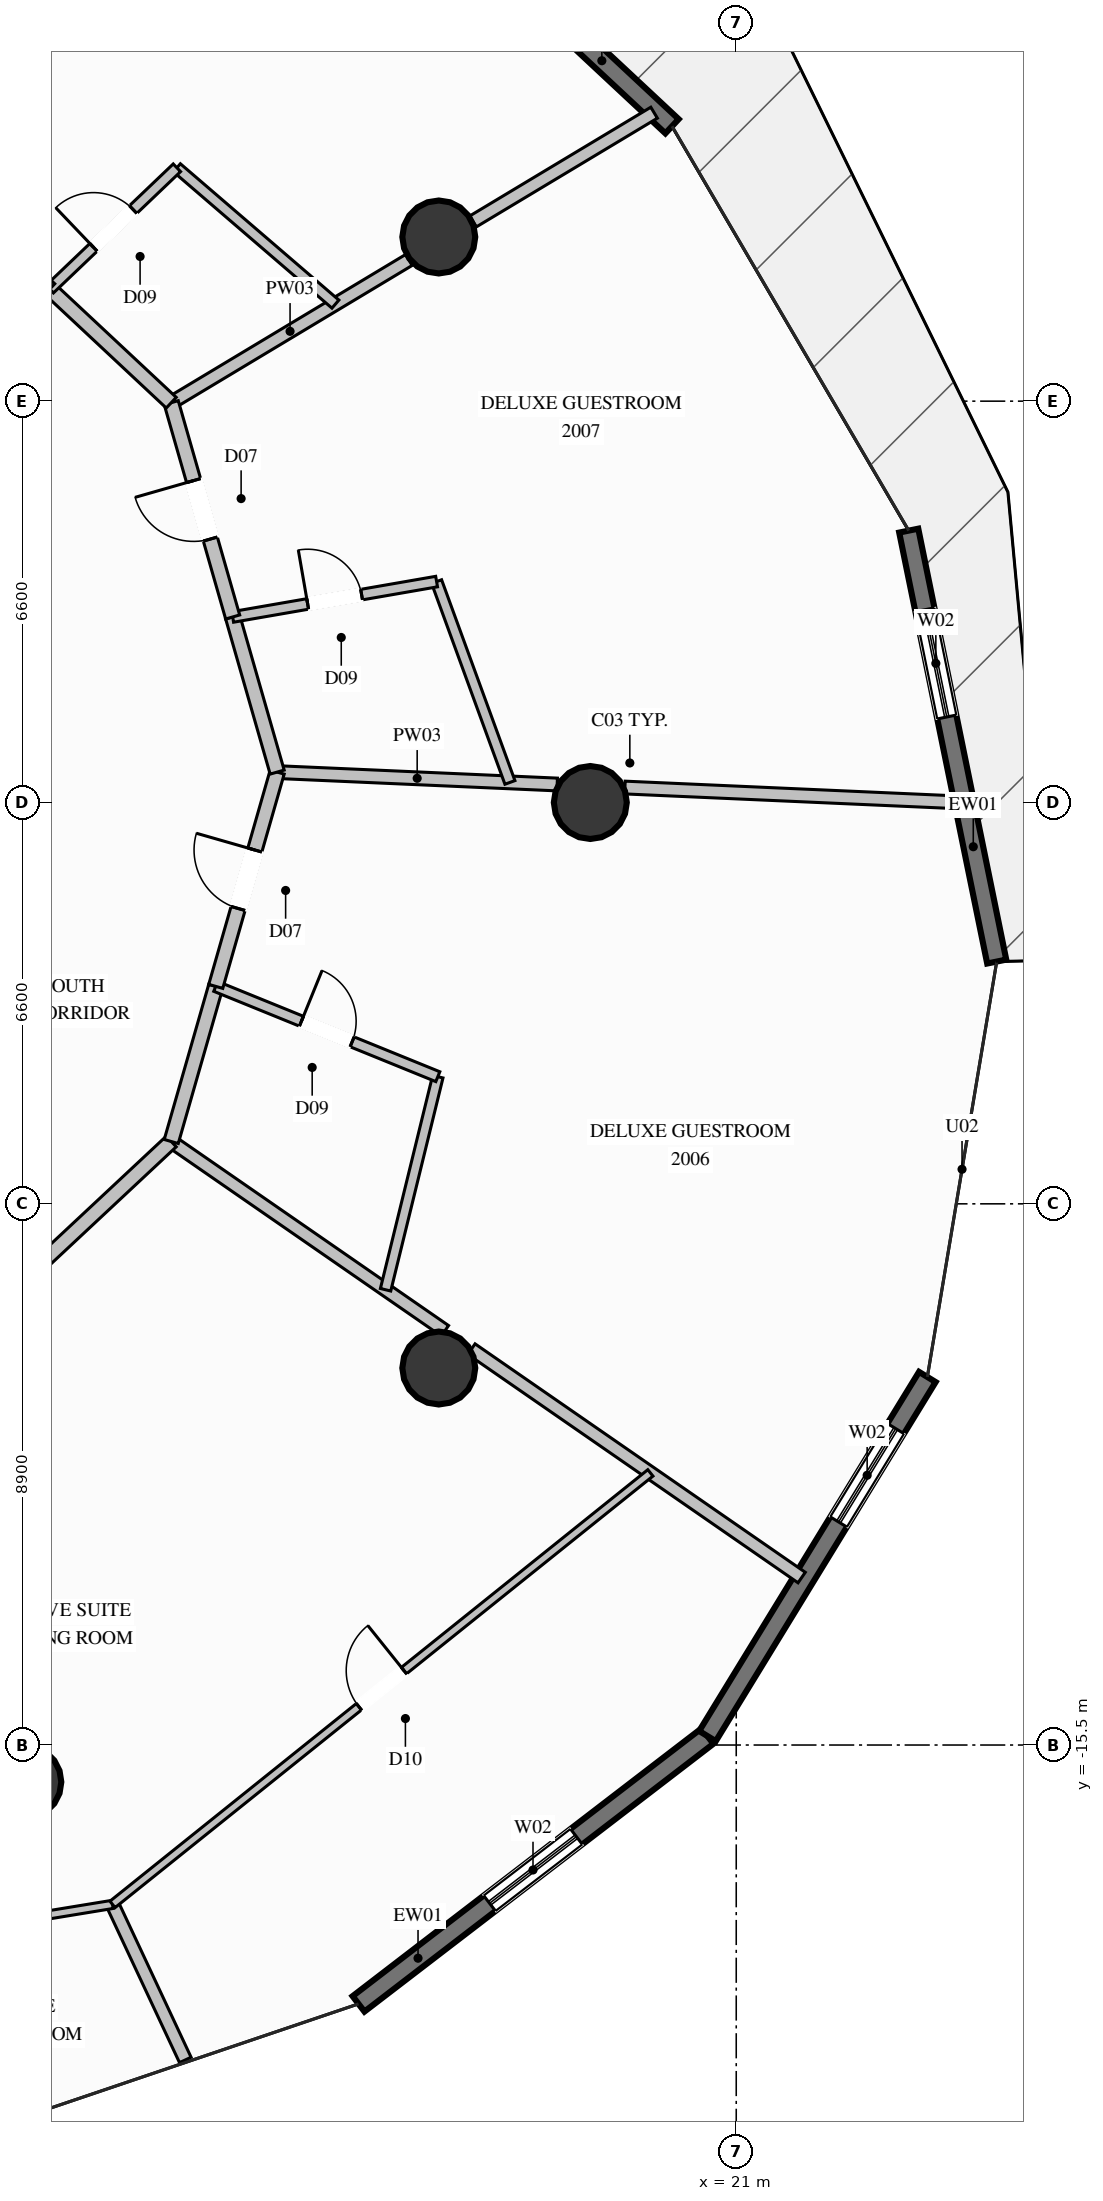
"""IFC4 building model, lengths in metres.
Left out: names, types, materials, properties, quantities, classifications, styles, units other than length and angle.
Written with IfcOpenShell. Run it as: python <this file> out.ifc"""

import sys

from ifc_helpers import new_model, si_unit, direction, frame, frame_2d, origin, origin_2d, place, context, subcontext, project, spatial, rectangle, circle, extrude, element, fill, save


model = new_model("IFC4")
c1 = context("Model", 3, precision=1e-05, world=origin(), true_north=direction((0.0, 1.0)))
c2 = subcontext(c1, "Body", "Model", "MODEL_VIEW")
j1 = project(units=[si_unit("LENGTHUNIT", "METRE"), si_unit("PLANEANGLEUNIT", "RADIAN")], contexts=[c1])
p1 = place(None, origin())
s1 = spatial("IfcSite", under=j1, at=p1, CompositionType="ELEMENT")
p2 = place(p1, origin())
s2 = spatial("IfcBuilding", under=s1, at=p2, CompositionType="ELEMENT")
p3 = place(p2, frame((0.0, 0.0, 75.2)))
s3 = spatial("IfcBuildingStorey", under=s2, at=p3, CompositionType="ELEMENT", Elevation=75.2)
for number, where, z_axis, x_axis in (
    (1, (18.6, 0.0, 0.0), (0.0, 0.0, 1.0), (1.0, 0.0, 0.0)),
    (2, (16.108, 9.3, 0.0), (0.0, 0.0, 1.0), (1.0, 0.0, 0.0)),
    (3, (9.3, -16.108, 0.0), (0.0, 0.0, 1.0), (1.0, 0.0, 0.0)),
    (4, (16.108, -9.3, 0.0), (0.0, 0.0, 1.0), (1.0, 0.0, 0.0)),
):
    element("IfcColumn", number, at=place(p3, frame(where, z_axis=z_axis, x_axis=x_axis)), inside=s3, PredefinedType="COLUMN", context=c2, shape_type="SweptSolid", body=[
        extrude(circle(Radius=0.6, at=origin_2d()), origin(), (0.0, 0.0, 1.0), 3.6),
    ])
p4 = place(p3, frame((23.837, 4.471, 0.0), z_axis=(0.0, 0.0, 1.0), x_axis=(0.200054576405, -0.979784755168, 0.0)))
e5 = element("IfcWall", 5, at=p4, inside=s3, PredefinedType="SOLIDWALL", context=c2, shape_type="SweptSolid", body=[
    extrude(rectangle(XDim=7.233, YDim=0.32, at=frame_2d((3.617, 0.0))), origin(), (0.0, 0.0, 1.0), 3.34),
])
p5 = place(p4, frame((1.328, 0.0, 0.35)))
e6 = element("IfcOpeningElement", 6, at=p5, cuts=e5, PredefinedType="OPENING", context=c2, shape_type="SweptSolid", body=[
    extrude(rectangle(XDim=1.8, YDim=2.6, at=frame_2d((0.9, 1.3))), frame((0.0, 0.17, 0.0), z_axis=(0.0, -1.0, 0.0), x_axis=(1.0, 0.0, 0.0)), (0.0, 0.0, 1.0), 0.34),
])
p6 = place(p3, frame((13.987, 16.682, 0.0), z_axis=(0.0, 0.0, 1.0), x_axis=(0.73100047145, -0.682376956484, 0.0)))
e7 = element("IfcWall", 7, at=p6, inside=s3, PredefinedType="SOLIDWALL", context=c2, shape_type="SweptSolid", body=[
    extrude(rectangle(XDim=8.149, YDim=0.32, at=frame_2d((4.075, 0.0))), origin(), (0.0, 0.0, 1.0), 3.34),
])
p7 = place(p6, frame((2.941, 0.0, 0.35)))
e8 = element("IfcOpeningElement", 8, at=p7, cuts=e7, PredefinedType="OPENING", context=c2, shape_type="SweptSolid", body=[
    extrude(rectangle(XDim=1.8, YDim=2.6, at=frame_2d((0.9, 1.3))), frame((0.0, 0.17, 0.0), z_axis=(0.0, -1.0, 0.0), x_axis=(1.0, 0.0, 0.0)), (0.0, 0.0, 1.0), 0.34),
])
p8 = place(p3, frame((20.527, -15.353, 0.0), z_axis=(0.0, 0.0, 1.0), x_axis=(-0.793329795388, -0.608792112095, 0.0)))
e9 = element("IfcWall", 9, at=p8, inside=s3, PredefinedType="SOLIDWALL", context=c2, shape_type="SweptSolid", body=[
    extrude(rectangle(XDim=7.234, YDim=0.32, at=frame_2d((3.617, 0.0))), origin(), (0.0, 0.0, 1.0), 3.34),
])
p9 = place(p8, frame((2.717, 0.0, 0.35)))
e10 = element("IfcOpeningElement", 10, at=p9, cuts=e9, PredefinedType="OPENING", context=c2, shape_type="SweptSolid", body=[
    extrude(rectangle(XDim=1.8, YDim=2.6, at=frame_2d((0.9, 1.3))), frame((0.0, 0.17, 0.0), z_axis=(0.0, -1.0, 0.0), x_axis=(1.0, 0.0, 0.0)), (0.0, 0.0, 1.0), 0.34),
])
p10 = place(p3, frame((24.143, -9.447, 0.0), z_axis=(0.0, 0.0, 1.0), x_axis=(-0.522158569524, -0.852848420455, 0.0)))
e11 = element("IfcWall", 11, at=p10, inside=s3, PredefinedType="SOLIDWALL", context=c2, shape_type="SweptSolid", body=[
    extrude(rectangle(XDim=6.925, YDim=0.32, at=frame_2d((3.462, 0.0))), origin(), (0.0, 0.0, 1.0), 3.34),
])
p11 = place(p10, frame((0.996, 0.0, 0.35)))
e12 = element("IfcOpeningElement", 12, at=p11, cuts=e11, PredefinedType="OPENING", context=c2, shape_type="SweptSolid", body=[
    extrude(rectangle(XDim=1.8, YDim=2.6, at=frame_2d((0.9, 1.3))), frame((0.0, 0.17, 0.0), z_axis=(0.0, -1.0, 0.0), x_axis=(1.0, 0.0, 0.0)), (0.0, 0.0, 1.0), 0.34),
])
p12 = place(p3, frame((13.45, 0.5, 0.0), z_axis=(0.0, 0.0, 1.0), x_axis=(0.999019228591, -0.044278447413, 0.0)))
e13 = element("IfcWall", 13, at=p12, inside=s3, PredefinedType="PARTITIONING", context=c2, shape_type="SweptSolid", body=[
    extrude(rectangle(XDim=4.61, YDim=0.21, at=frame_2d((2.305, 0.0))), origin(), (0.0, 0.0, 1.0), 3.34),
])
p13 = place(p3, frame((19.169, 0.246, 0.0), z_axis=(0.0, 0.0, 1.0), x_axis=(0.999015194397, -0.044369374161, 0.0)))
e14 = element("IfcWall", 14, at=p13, inside=s3, PredefinedType="PARTITIONING", context=c2, shape_type="SweptSolid", body=[
    extrude(rectangle(XDim=5.546, YDim=0.21, at=frame_2d((2.773, 0.0))), origin(), (0.0, 0.0, 1.0), 3.34),
])
p14 = place(p3, frame((11.708, 6.575, 0.0), z_axis=(0.0, 0.0, 1.0), x_axis=(0.857261290525, 0.514881617236, 0.0)))
e15 = element("IfcWall", 15, at=p14, inside=s3, PredefinedType="PARTITIONING", context=c2, shape_type="SweptSolid", body=[
    extrude(rectangle(XDim=4.559, YDim=0.21, at=frame_2d((2.279, 0.0))), origin(), (0.0, 0.0, 1.0), 2.709),
])
p15 = place(p3, frame((16.672, 9.556, 0.0), z_axis=(0.0, 0.0, 1.0), x_axis=(0.857238479405, 0.514919595109, 0.0)))
e16 = element("IfcWall", 16, at=p15, inside=s3, PredefinedType="PARTITIONING", context=c2, shape_type="SweptSolid", body=[
    extrude(rectangle(XDim=3.473, YDim=0.21, at=frame_2d((1.736, 0.0))), origin(), (0.0, 0.0, 1.0), 3.34),
])
p16 = place(p3, frame((11.708, -5.575, 0.0), z_axis=(0.0, 0.0, 1.0), x_axis=(0.822450672887, -0.568836435777, 0.0)))
e17 = element("IfcWall", 17, at=p16, inside=s3, PredefinedType="PARTITIONING", context=c2, shape_type="SweptSolid", body=[
    extrude(rectangle(XDim=5.473, YDim=0.21, at=frame_2d((2.736, 0.0))), origin(), (0.0, 0.0, 1.0), 2.709),
])
p17 = place(p3, frame((16.645, -8.989, 0.0), z_axis=(0.0, 0.0, 1.0), x_axis=(0.822389116531, -0.568925426581, 0.0)))
e18 = element("IfcWall", 18, at=p17, inside=s3, PredefinedType="PARTITIONING", context=c2, shape_type="SweptSolid", body=[
    extrude(rectangle(XDim=6.604, YDim=0.21, at=frame_2d((3.302, 0.0))), origin(), (0.0, 0.0, 1.0), 3.34),
])
p18 = place(p3, frame((10.742, -18.121, 0.0), z_axis=(0.0, 0.0, 1.0), x_axis=(0.423860139743, -0.905727653292, 0.0)))
e19 = element("IfcWall", 19, at=p18, inside=s3, PredefinedType="PARTITIONING", context=c2, shape_type="SweptSolid", body=[
    extrude(rectangle(XDim=2.824, YDim=0.21, at=frame_2d((1.412, 0.0))), origin(), (0.0, 0.0, 1.0), 3.34),
])
p19 = place(p3, frame((6.95, -10.022, 0.0), z_axis=(0.0, 0.0, 1.0), x_axis=(0.730582633102, 0.682824293804, 0.0)))
e20 = element("IfcWall", 20, at=p19, inside=s3, PredefinedType="PARTITIONING", context=c2, shape_type="SweptSolid", body=[
    extrude(rectangle(XDim=6.513, YDim=0.24, at=frame_2d((3.256, 0.0))), origin(), (0.0, 0.0, 1.0), 3.34),
])
p20 = place(p3, frame((0.108, -19.863, 0.0), z_axis=(0.0, 0.0, 1.0), x_axis=(0.986847521354, 0.161653857356, 0.0)))
e21 = element("IfcWall", 21, at=p20, inside=s3, PredefinedType="PARTITIONING", context=c2, shape_type="SweptSolid", body=[
    extrude(rectangle(XDim=10.776, YDim=0.135, at=frame_2d((5.388, 0.0))), origin(), (0.0, 0.0, 1.0), 3.34),
])
p21 = place(p20, frame((4.913, 0.0, 0.0)))
e22 = element("IfcOpeningElement", 22, at=p21, cuts=e21, PredefinedType="OPENING", context=c2, shape_type="SweptSolid", body=[
    extrude(rectangle(XDim=0.95, YDim=2.1, at=frame_2d((0.475, 1.05))), frame((0.0, 0.078, 0.0), z_axis=(0.0, -1.0, 0.0), x_axis=(1.0, 0.0, 0.0)), (0.0, 0.0, 1.0), 0.155),
])
p22 = place(p3, frame((10.742, -18.121, 0.0), z_axis=(0.0, 0.0, 1.0), x_axis=(0.780032185097, 0.625739394807, 0.0)))
e23 = element("IfcWall", 23, at=p22, inside=s3, PredefinedType="PARTITIONING", context=c2, shape_type="SweptSolid", body=[
    extrude(rectangle(XDim=11.341, YDim=0.135, at=frame_2d((5.67, 0.0))), origin(), (0.0, 0.0, 1.0), 3.34),
])
p23 = place(p22, frame((5.195, 0.0, 0.0)))
e24 = element("IfcOpeningElement", 24, at=p23, cuts=e23, PredefinedType="OPENING", context=c2, shape_type="SweptSolid", body=[
    extrude(rectangle(XDim=0.95, YDim=2.1, at=frame_2d((0.475, 1.05))), frame((0.0, 0.078, 0.0), z_axis=(0.0, -1.0, 0.0), x_axis=(1.0, 0.0, 0.0)), (0.0, 0.0, 1.0), 0.155),
])
p24 = place(p3, frame((11.708, -5.575, 0.0), z_axis=(0.0, 0.0, 1.0), x_axis=(0.275790140823, 0.961217872402, 0.0)))
e25 = element("IfcWall", 25, at=p24, inside=s3, PredefinedType="PARTITIONING", context=c2, shape_type="SweptSolid", body=[
    extrude(rectangle(XDim=2.654, YDim=0.24, at=frame_2d((1.327, 0.0))), origin(), (0.0, 0.0, 1.0), 3.34),
])
p25 = place(p3, frame((15.233, -8.013, 0.0), z_axis=(0.0, 0.0, 1.0), x_axis=(0.238138425117, 0.971231224005, 0.0)))
e26 = element("IfcWall", 26, at=p25, inside=s3, PredefinedType="PLUMBINGWALL", context=c2, shape_type="SweptSolid", body=[
    extrude(rectangle(XDim=3.608, YDim=0.175, at=frame_2d((1.804, 0.0))), origin(), (0.0, 0.0, 1.0), 3.34),
])
p26 = place(p3, frame((12.44, -3.024, 0.0), z_axis=(0.0, 0.0, 1.0), x_axis=(0.926338988139, -0.376690959613, 0.0)))
e27 = element("IfcWall", 27, at=p26, inside=s3, PredefinedType="PLUMBINGWALL", context=c2, shape_type="SweptSolid", body=[
    extrude(rectangle(XDim=3.943, YDim=0.175, at=frame_2d((1.971, 0.0))), origin(), (0.0, 0.0, 1.0), 3.34),
])
p27 = place(p26, frame((1.521, 0.0, 0.0)))
e28 = element("IfcOpeningElement", 28, at=p27, cuts=e27, PredefinedType="OPENING", context=c2, shape_type="SweptSolid", body=[
    extrude(rectangle(XDim=0.9, YDim=2.1, at=frame_2d((0.45, 1.05))), frame((0.0, 0.098, 0.0), z_axis=(0.0, -1.0, 0.0), x_axis=(1.0, 0.0, 0.0)), (0.0, 0.0, 1.0), 0.195),
])
p28 = place(p3, frame((12.44, -3.024, 0.0), z_axis=(0.0, 0.0, 1.0), x_axis=(0.275521481409, 0.961294914832, 0.0)))
e29 = element("IfcWall", 29, at=p28, inside=s3, PredefinedType="PARTITIONING", context=c2, shape_type="SweptSolid", body=[
    extrude(rectangle(XDim=3.666, YDim=0.24, at=frame_2d((1.833, 0.0))), origin(), (0.0, 0.0, 1.0), 3.34),
])
p29 = place(p28, frame((1.333, 0.0, 0.0)))
e30 = element("IfcOpeningElement", 30, at=p29, cuts=e29, PredefinedType="OPENING", context=c2, shape_type="SweptSolid", body=[
    extrude(rectangle(XDim=1.0, YDim=2.2, at=frame_2d((0.5, 1.1))), frame((0.0, 0.13, 0.0), z_axis=(0.0, -1.0, 0.0), x_axis=(1.0, 0.0, 0.0)), (0.0, 0.0, 1.0), 0.26),
])
p30 = place(p3, frame((13.45, 0.5, 0.0), z_axis=(0.0, 0.0, 1.0), x_axis=(-0.275790140823, 0.961217872402, 0.0)))
e31 = element("IfcWall", 31, at=p30, inside=s3, PredefinedType="PARTITIONING", context=c2, shape_type="SweptSolid", body=[
    extrude(rectangle(XDim=2.654, YDim=0.24, at=frame_2d((1.327, 0.0))), origin(), (0.0, 0.0, 1.0), 3.34),
])
p31 = place(p3, frame((17.278, 0.33, 0.0), z_axis=(0.0, 0.0, 1.0), x_axis=(-0.342991514452, 0.939338501827, 0.0)))
e32 = element("IfcWall", 32, at=p31, inside=s3, PredefinedType="PLUMBINGWALL", context=c2, shape_type="SweptSolid", body=[
    extrude(rectangle(XDim=3.516, YDim=0.175, at=frame_2d((1.758, 0.0))), origin(), (0.0, 0.0, 1.0), 3.34),
])
p32 = place(p3, frame((12.718, 3.051, 0.0), z_axis=(0.0, 0.0, 1.0), x_axis=(0.985274853181, 0.170977962584, 0.0)))
e33 = element("IfcWall", 33, at=p32, inside=s3, PredefinedType="PLUMBINGWALL", context=c2, shape_type="SweptSolid", body=[
    extrude(rectangle(XDim=3.404, YDim=0.175, at=frame_2d((1.702, 0.0))), origin(), (0.0, 0.0, 1.0), 3.34),
])
p33 = place(p32, frame((1.252, 0.0, 0.0)))
e34 = element("IfcOpeningElement", 34, at=p33, cuts=e33, PredefinedType="OPENING", context=c2, shape_type="SweptSolid", body=[
    extrude(rectangle(XDim=0.9, YDim=2.1, at=frame_2d((0.45, 1.05))), frame((0.0, 0.098, 0.0), z_axis=(0.0, -1.0, 0.0), x_axis=(1.0, 0.0, 0.0)), (0.0, 0.0, 1.0), 0.195),
])
p34 = place(p3, frame((12.718, 3.051, 0.0), z_axis=(0.0, 0.0, 1.0), x_axis=(-0.275521481409, 0.961294914832, 0.0)))
e35 = element("IfcWall", 35, at=p34, inside=s3, PredefinedType="PARTITIONING", context=c2, shape_type="SweptSolid", body=[
    extrude(rectangle(XDim=3.666, YDim=0.24, at=frame_2d((1.833, 0.0))), origin(), (0.0, 0.0, 1.0), 3.34),
])
p35 = place(p34, frame((1.333, 0.0, 0.0)))
e36 = element("IfcOpeningElement", 36, at=p35, cuts=e35, PredefinedType="OPENING", context=c2, shape_type="SweptSolid", body=[
    extrude(rectangle(XDim=1.0, YDim=2.2, at=frame_2d((0.5, 1.1))), frame((0.0, 0.13, 0.0), z_axis=(0.0, -1.0, 0.0), x_axis=(1.0, 0.0, 0.0)), (0.0, 0.0, 1.0), 0.26),
])
p36 = place(p3, frame((11.708, 6.575, 0.0), z_axis=(0.0, 0.0, 1.0), x_axis=(-0.730449499178, 0.682966711597, 0.0)))
e37 = element("IfcWall", 37, at=p36, inside=s3, PredefinedType="PARTITIONING", context=c2, shape_type="SweptSolid", body=[
    extrude(rectangle(XDim=2.735, YDim=0.24, at=frame_2d((1.368, 0.0))), origin(), (0.0, 0.0, 1.0), 3.34),
])
p37 = place(p3, frame((14.408, 8.196, 0.0), z_axis=(0.0, 0.0, 1.0), x_axis=(-0.758188004492, 0.652036003488, 0.0)))
e38 = element("IfcWall", 38, at=p37, inside=s3, PredefinedType="PLUMBINGWALL", context=c2, shape_type="SweptSolid", body=[
    extrude(rectangle(XDim=3.438, YDim=0.175, at=frame_2d((1.719, 0.0))), origin(), (0.0, 0.0, 1.0), 3.34),
])
p38 = place(p3, frame((9.71, 8.443, 0.0), z_axis=(0.0, 0.0, 1.0), x_axis=(0.723553055792, 0.690268770447, 0.0)))
e39 = element("IfcWall", 39, at=p38, inside=s3, PredefinedType="PLUMBINGWALL", context=c2, shape_type="SweptSolid", body=[
    extrude(rectangle(XDim=2.89, YDim=0.175, at=frame_2d((1.445, 0.0))), origin(), (0.0, 0.0, 1.0), 3.34),
])
p39 = place(p38, frame((0.995, 0.0, 0.0)))
e40 = element("IfcOpeningElement", 40, at=p39, cuts=e39, PredefinedType="OPENING", context=c2, shape_type="SweptSolid", body=[
    extrude(rectangle(XDim=0.9, YDim=2.1, at=frame_2d((0.45, 1.05))), frame((0.0, 0.098, 0.0), z_axis=(0.0, -1.0, 0.0), x_axis=(1.0, 0.0, 0.0)), (0.0, 0.0, 1.0), 0.195),
])
p40 = place(p3, frame((9.71, 8.443, 0.0), z_axis=(0.0, 0.0, 1.0), x_axis=(-0.730679025356, 0.682721145054, 0.0)))
e41 = element("IfcWall", 41, at=p40, inside=s3, PredefinedType="PARTITIONING", context=c2, shape_type="SweptSolid", body=[
    extrude(rectangle(XDim=3.777, YDim=0.24, at=frame_2d((1.889, 0.0))), origin(), (0.0, 0.0, 1.0), 3.34),
])
p41 = place(p40, frame((1.389, 0.0, 0.0)))
e42 = element("IfcOpeningElement", 42, at=p41, cuts=e41, PredefinedType="OPENING", context=c2, shape_type="SweptSolid", body=[
    extrude(rectangle(XDim=1.0, YDim=2.2, at=frame_2d((0.5, 1.1))), frame((0.0, 0.13, 0.0), z_axis=(0.0, -1.0, 0.0), x_axis=(1.0, 0.0, 0.0)), (0.0, 0.0, 1.0), 0.26),
])
p42 = place(p5, origin())
e43 = element("IfcWindow", 43, at=p42, inside=s3, PartitioningType="SINGLE_PANEL", PredefinedType="WINDOW", context=c2, shape_type="SweptSolid", body=[
    extrude(rectangle(XDim=1.8, YDim=2.6, at=frame_2d((0.9, 1.3))), frame((0.0, 0.03, 0.0), z_axis=(0.0, -1.0, 0.0), x_axis=(1.0, 0.0, 0.0)), (0.0, 0.0, 1.0), 0.06),
])
fill(e6, e43)
p43 = place(p9, origin())
e44 = element("IfcWindow", 44, at=p43, inside=s3, PartitioningType="SINGLE_PANEL", PredefinedType="WINDOW", context=c2, shape_type="SweptSolid", body=[
    extrude(rectangle(XDim=1.8, YDim=2.6, at=frame_2d((0.9, 1.3))), frame((0.0, 0.03, 0.0), z_axis=(0.0, -1.0, 0.0), x_axis=(1.0, 0.0, 0.0)), (0.0, 0.0, 1.0), 0.06),
])
fill(e10, e44)
p44 = place(p11, origin())
e45 = element("IfcWindow", 45, at=p44, inside=s3, PartitioningType="SINGLE_PANEL", PredefinedType="WINDOW", context=c2, shape_type="SweptSolid", body=[
    extrude(rectangle(XDim=1.8, YDim=2.6, at=frame_2d((0.9, 1.3))), frame((0.0, 0.03, 0.0), z_axis=(0.0, -1.0, 0.0), x_axis=(1.0, 0.0, 0.0)), (0.0, 0.0, 1.0), 0.06),
])
fill(e12, e45)
p45 = place(p23, origin())
e46 = element("IfcDoor", 46, at=p45, inside=s3, OperationType="SINGLE_SWING_RIGHT", PredefinedType="DOOR", context=c2, shape_type="SweptSolid", body=[
    extrude(rectangle(XDim=0.95, YDim=2.1, at=frame_2d((0.475, 1.05))), frame((0.0, 0.025, 0.0), z_axis=(0.0, -1.0, 0.0), x_axis=(1.0, 0.0, 0.0)), (0.0, 0.0, 1.0), 0.05),
])
fill(e24, e46)
p46 = place(p27, origin())
e47 = element("IfcDoor", 47, at=p46, inside=s3, OperationType="SINGLE_SWING_LEFT", PredefinedType="DOOR", context=c2, shape_type="SweptSolid", body=[
    extrude(rectangle(XDim=0.9, YDim=2.1, at=frame_2d((0.45, 1.05))), frame((0.0, 0.025, 0.0), z_axis=(0.0, -1.0, 0.0), x_axis=(1.0, 0.0, 0.0)), (0.0, 0.0, 1.0), 0.05),
])
fill(e28, e47)
p47 = place(p29, origin())
e48 = element("IfcDoor", 48, at=p47, inside=s3, OperationType="SINGLE_SWING_RIGHT", PredefinedType="DOOR", context=c2, shape_type="SweptSolid", body=[
    extrude(rectangle(XDim=1.0, YDim=2.2, at=frame_2d((0.5, 1.1))), frame((0.0, 0.025, 0.0), z_axis=(0.0, -1.0, 0.0), x_axis=(1.0, 0.0, 0.0)), (0.0, 0.0, 1.0), 0.05),
])
fill(e30, e48)
p48 = place(p33, origin())
e49 = element("IfcDoor", 49, at=p48, inside=s3, OperationType="SINGLE_SWING_LEFT", PredefinedType="DOOR", context=c2, shape_type="SweptSolid", body=[
    extrude(rectangle(XDim=0.9, YDim=2.1, at=frame_2d((0.45, 1.05))), frame((0.0, 0.025, 0.0), z_axis=(0.0, -1.0, 0.0), x_axis=(1.0, 0.0, 0.0)), (0.0, 0.0, 1.0), 0.05),
])
fill(e34, e49)
p49 = place(p35, origin())
e50 = element("IfcDoor", 50, at=p49, inside=s3, OperationType="SINGLE_SWING_RIGHT", PredefinedType="DOOR", context=c2, shape_type="SweptSolid", body=[
    extrude(rectangle(XDim=1.0, YDim=2.2, at=frame_2d((0.5, 1.1))), frame((0.0, 0.025, 0.0), z_axis=(0.0, -1.0, 0.0), x_axis=(1.0, 0.0, 0.0)), (0.0, 0.0, 1.0), 0.05),
])
fill(e36, e50)
p50 = place(p39, origin())
e51 = element("IfcDoor", 51, at=p50, inside=s3, OperationType="SINGLE_SWING_LEFT", PredefinedType="DOOR", context=c2, shape_type="SweptSolid", body=[
    extrude(rectangle(XDim=0.9, YDim=2.1, at=frame_2d((0.45, 1.05))), frame((0.0, 0.025, 0.0), z_axis=(0.0, -1.0, 0.0), x_axis=(1.0, 0.0, 0.0)), (0.0, 0.0, 1.0), 0.05),
])
fill(e40, e51)
save(model, sys.argv[1])
